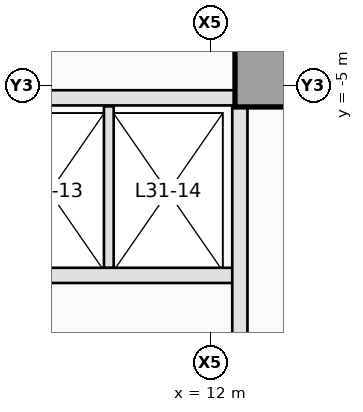
"""IFC4 building model, lengths in metres.
Left out: names, types, materials, properties, quantities, classifications, styles, units other than length and angle.
Written with IfcOpenShell. Run it as: python <this file> out.ifc"""

import sys

from ifc_helpers import new_model, si_unit, direction, frame, frame_2d, origin, origin_2d, place, context, subcontext, project, spatial, rectangle, extrude, element, save


model = new_model("IFC4")
c1 = context("Model", 3, precision=1e-05, world=origin(), true_north=direction((0.0, 1.0)))
c2 = subcontext(c1, "Body", "Model", "MODEL_VIEW")
j1 = project(units=[si_unit("LENGTHUNIT", "METRE"), si_unit("PLANEANGLEUNIT", "RADIAN")], contexts=[c1])
p1 = place(None, origin())
s1 = spatial("IfcSite", under=j1, at=p1, CompositionType="ELEMENT")
p2 = place(p1, origin())
s2 = spatial("IfcBuilding", under=s1, at=p2, CompositionType="ELEMENT")
p3 = place(p2, frame((0.0, 0.0, 116.0)))
s3 = spatial("IfcBuildingStorey", under=s2, at=p3, CompositionType="ELEMENT", Elevation=116.0)
p4 = place(p3, frame((12.95, -4.8, 0.0), z_axis=(0.0, 0.0, 1.0), x_axis=(1.0, 0.0, 0.0)))
e1 = element("IfcColumn", 1, at=p4, inside=s3, PredefinedType="COLUMN", context=c2, shape_type="SweptSolid", body=[
    extrude(rectangle(XDim=1.1, YDim=1.1, at=origin_2d()), origin(), (0.0, 0.0, 1.0), 3.5),
])
p5 = place(p3, frame((9.16, -8.12, 0.0), z_axis=(0.0, 0.0, 1.0), x_axis=(1.0, 0.0, 0.0)))
e2 = element("IfcWall", 2, at=p5, inside=s3, PredefinedType="PARTITIONING", context=c2, shape_type="SweptSolid", body=[
    extrude(rectangle(XDim=3.22, YDim=0.25, at=frame_2d((1.61, 0.0))), origin(), (0.0, 0.0, 1.0), 3.25),
])
p6 = place(p3, frame((12.48, -10.18, 0.0), z_axis=(0.0, 0.0, 1.0), x_axis=(0.0, 1.0, 0.0)))
e3 = element("IfcWall", 3, at=p6, inside=s3, PredefinedType="PARTITIONING", context=c2, shape_type="SweptSolid", body=[
    extrude(rectangle(XDim=4.828, YDim=0.25, at=frame_2d((2.414, 0.0))), origin(), (0.0, 0.0, 1.0), 3.25),
])
p7 = place(p3, frame((4.302, -5.2, 0.0), z_axis=(0.0, 0.0, 1.0), x_axis=(1.0, 0.0, 0.0)))
e4 = element("IfcWall", 4, at=p7, inside=s3, PredefinedType="PARTITIONING", context=c2, shape_type="SweptSolid", body=[
    extrude(rectangle(XDim=8.096, YDim=0.25, at=frame_2d((4.048, 0.0))), origin(), (0.0, 0.0, 1.0), 3.25),
])
p8 = place(p3, frame((10.325, -7.993, 0.0), z_axis=(0.0, 0.0, 1.0), x_axis=(0.0, 1.0, 0.0)))
e5 = element("IfcWall", 5, at=p8, inside=s3, PredefinedType="PARTITIONING", context=c2, shape_type="SweptSolid", body=[
    extrude(rectangle(XDim=2.653, YDim=0.16, at=frame_2d((1.326, 0.0))), origin(), (0.0, 0.0, 1.0), 3.25),
])
save(model, sys.argv[1])
